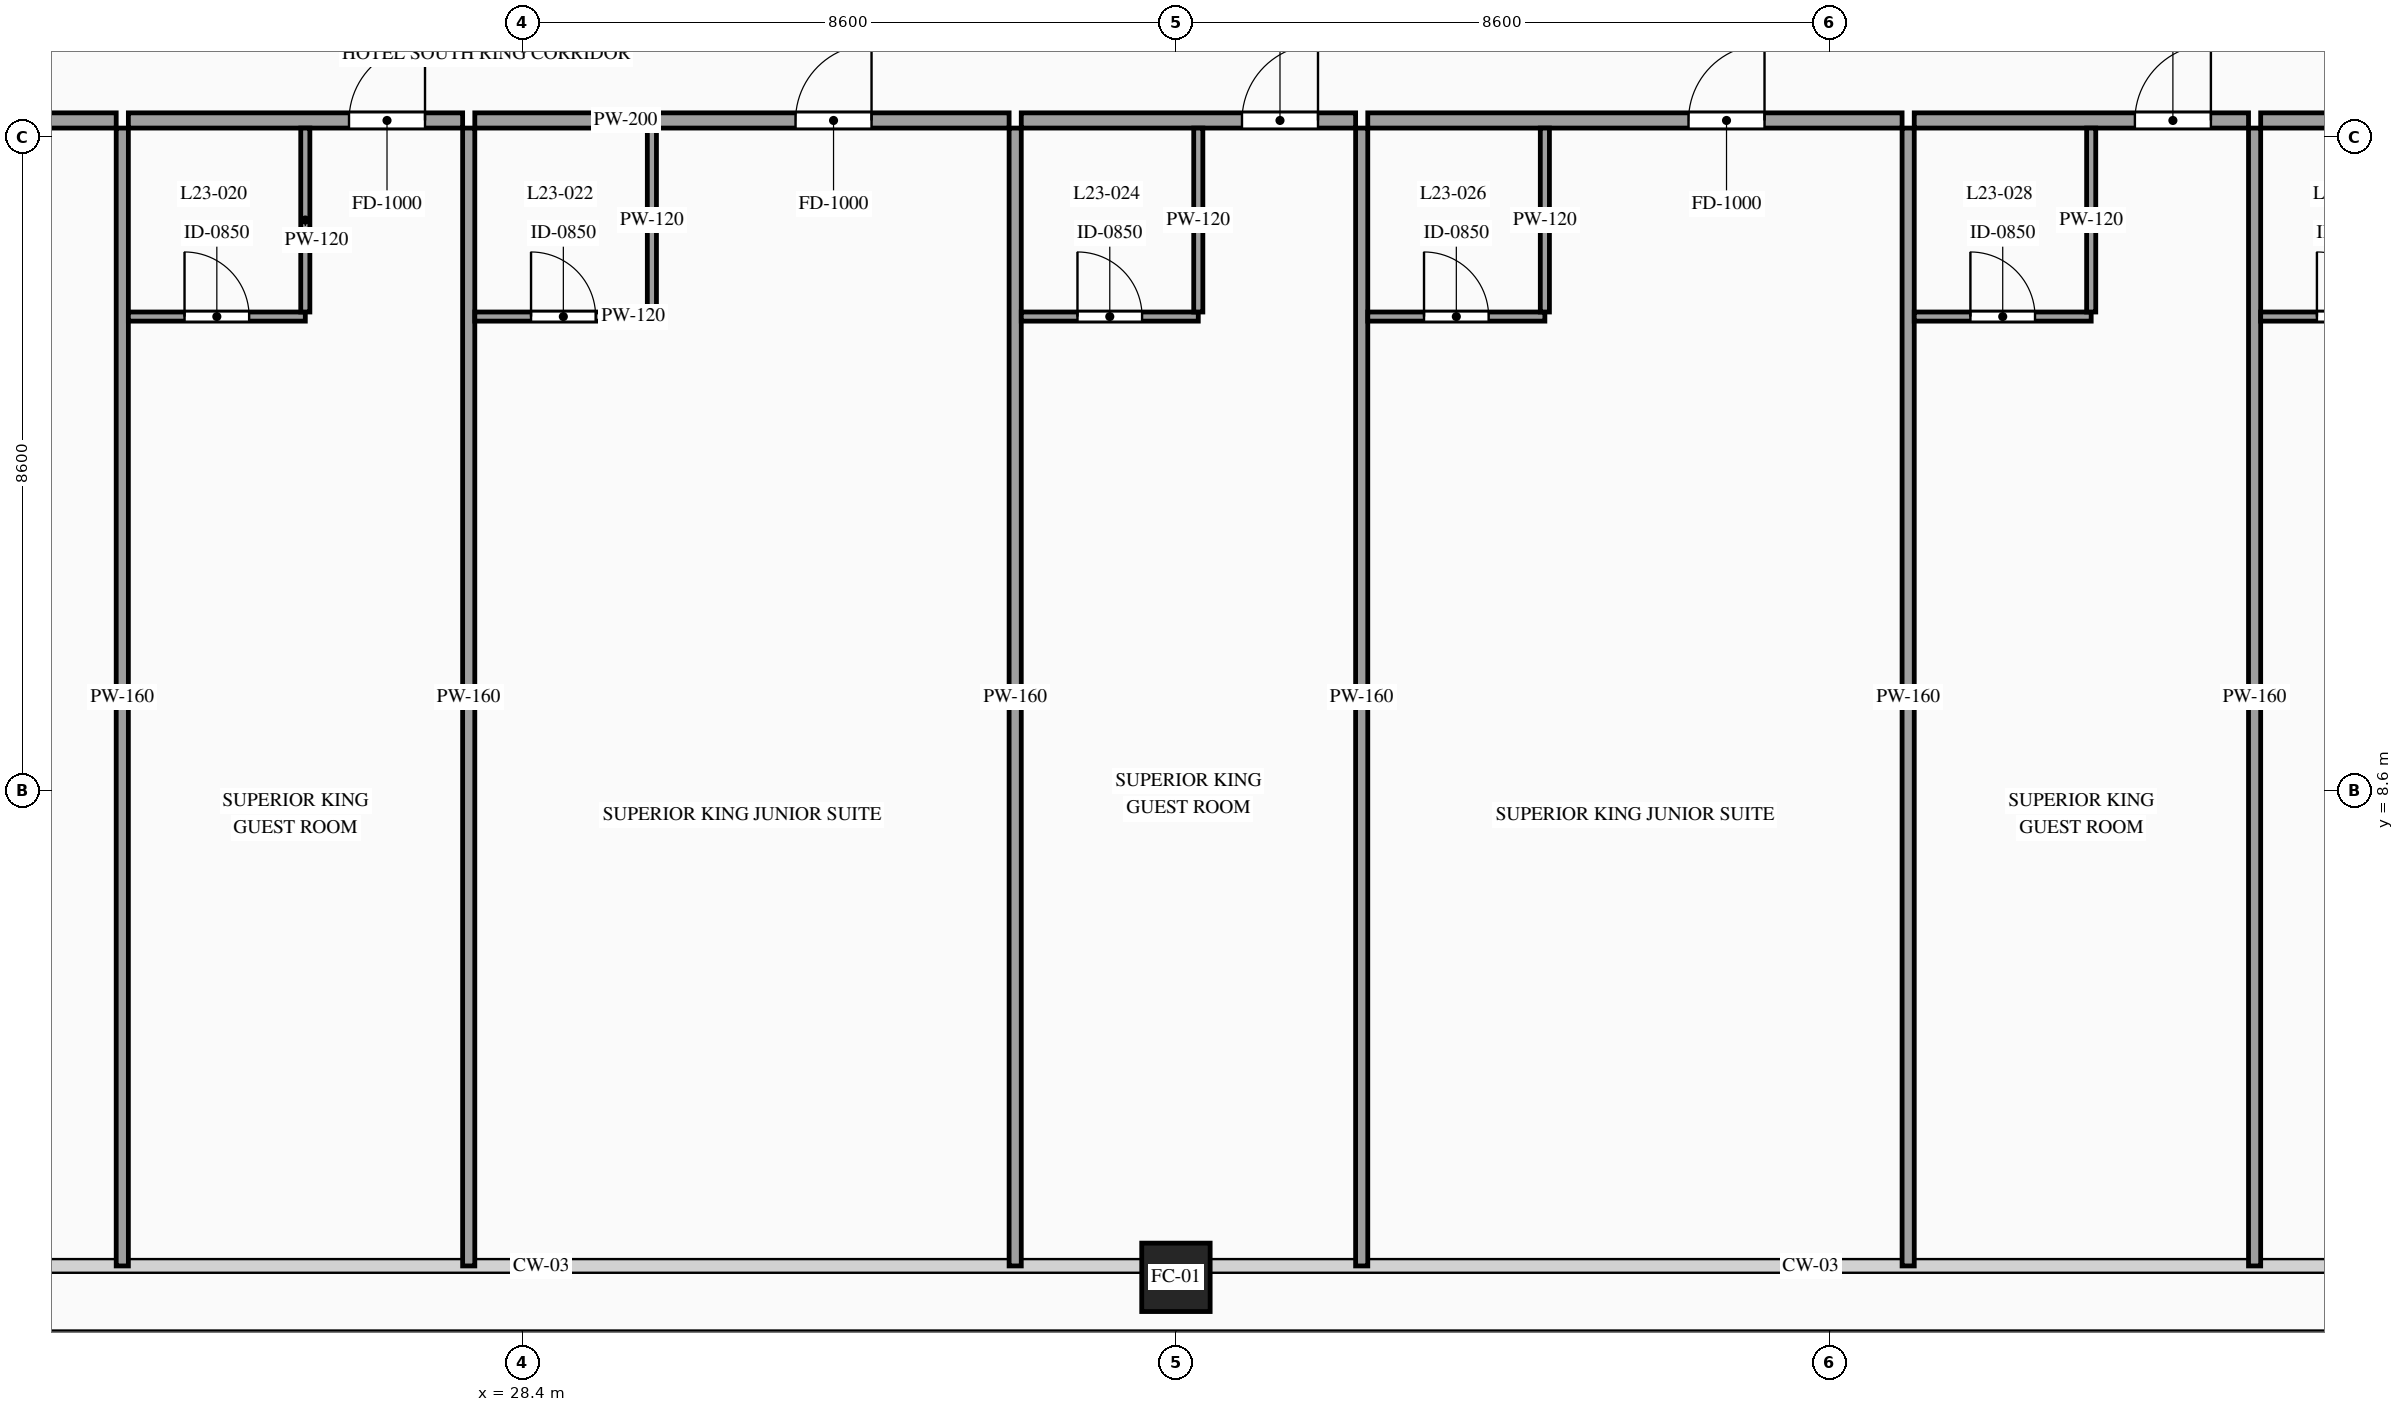
"""IFC4 building model, lengths in metres.
Left out: names, types, materials, properties, quantities, classifications, styles, units other than length and angle.
Written with IfcOpenShell. Run it as: python <this file> out.ifc"""

import sys

from ifc_helpers import new_model, si_unit, direction, frame, frame_2d, origin, origin_2d, place, context, subcontext, project, spatial, rectangle, hollow_rectangle, extrude, source, transform, mapped, element, fill, save


model = new_model("IFC4")
c1 = context("Model", 3, precision=1e-05, world=origin(), true_north=direction((0.0, 1.0)))
c2 = subcontext(c1, "Body", "Model", "MODEL_VIEW")
j1 = project(units=[si_unit("LENGTHUNIT", "METRE"), si_unit("PLANEANGLEUNIT", "RADIAN")], contexts=[c1])
p1 = place(None, origin())
s1 = spatial("IfcSite", under=j1, at=p1, CompositionType="ELEMENT")
p2 = place(p1, origin())
s2 = spatial("IfcBuilding", under=s1, at=p2, CompositionType="ELEMENT")
p3 = place(p2, frame((0.0, 0.0, 90.2)))
s3 = spatial("IfcBuildingStorey", under=s2, at=p3, CompositionType="ELEMENT", Elevation=90.2)
m1 = source(origin(), c2, "Body", "SweptSolid", [
    extrude(hollow_rectangle(XDim=0.9, YDim=0.9, WallThickness=0.042, at=origin_2d()), origin(), (0.0, 0.0, 1.0), 3.6),
])
p4 = place(p3, frame((37.0, 2.2, 0.0), z_axis=(0.0, 0.0, 1.0), x_axis=(1.0, 0.0, 0.0)))
e1 = element("IfcColumn", 1, at=p4, inside=s3, PredefinedType="COLUMN", context=c2, shape_type="MappedRepresentation", body=[
    mapped(m1, transform((0.0, 0.0, 0.0), scale=1.0)),
])
p5 = place(p3, frame((16.44, 17.42, 0.0), z_axis=(0.0, 0.0, 1.0), x_axis=(1.0, 0.0, 0.0)))
e2 = element("IfcWall", 2, at=p5, inside=s3, PredefinedType="PARTITIONING", context=c2, shape_type="SweptSolid", body=[
    extrude(rectangle(XDim=6.617, YDim=0.2, at=frame_2d((3.309, 0.0))), origin(), (0.0, 0.0, 1.0), 3.38),
])
p6 = place(p5, frame((4.013, 0.0, 0.0)))
e3 = element("IfcOpeningElement", 3, at=p6, cuts=e2, PredefinedType="OPENING", context=c2, shape_type="SweptSolid", body=[
    extrude(rectangle(XDim=1.0, YDim=2.2, at=frame_2d((0.5, 1.1))), frame((0.0, 0.115, 0.0), z_axis=(0.0, -1.0, 0.0), x_axis=(1.0, 0.0, 0.0)), (0.0, 0.0, 1.0), 0.23),
])
m2 = source(origin(), c2, "Body", "SweptSolid", [
    extrude(rectangle(XDim=14.97, YDim=0.16, at=frame_2d((7.485, 0.0))), origin(), (0.0, 0.0, 1.0), 3.38),
])
p7 = place(p3, frame((23.137, 2.35, 0.0), z_axis=(0.0, 0.0, 1.0), x_axis=(0.0, 1.0, 0.0)))
e4 = element("IfcWall", 4, at=p7, inside=s3, PredefinedType="PARTITIONING", context=c2, shape_type="MappedRepresentation", body=[
    mapped(m2, transform((0.0, 0.0, 0.0), scale=1.0)),
])
p8 = place(p3, frame((23.217, 17.42, 0.0), z_axis=(0.0, 0.0, 1.0), x_axis=(1.0, 0.0, 0.0)))
e5 = element("IfcWall", 5, at=p8, inside=s3, PredefinedType="PARTITIONING", context=c2, shape_type="SweptSolid", body=[
    extrude(rectangle(XDim=4.398, YDim=0.2, at=frame_2d((2.199, 0.0))), origin(), (0.0, 0.0, 1.0), 3.38),
])
p9 = place(p8, frame((2.903, 0.0, 0.0)))
e6 = element("IfcOpeningElement", 6, at=p9, cuts=e5, PredefinedType="OPENING", context=c2, shape_type="SweptSolid", body=[
    extrude(rectangle(XDim=1.0, YDim=2.2, at=frame_2d((0.5, 1.1))), frame((0.0, 0.115, 0.0), z_axis=(0.0, -1.0, 0.0), x_axis=(1.0, 0.0, 0.0)), (0.0, 0.0, 1.0), 0.23),
])
p10 = place(p3, frame((27.695, 2.35, 0.0), z_axis=(0.0, 0.0, 1.0), x_axis=(0.0, 1.0, 0.0)))
e7 = element("IfcWall", 7, at=p10, inside=s3, PredefinedType="PARTITIONING", context=c2, shape_type="MappedRepresentation", body=[
    mapped(m2, transform((0.0, 0.0, 0.0), scale=1.0)),
])
p11 = place(p3, frame((23.217, 14.84, 0.0), z_axis=(0.0, 0.0, 1.0), x_axis=(1.0, 0.0, 0.0)))
e8 = element("IfcWall", 8, at=p11, inside=s3, PredefinedType="PARTITIONING", context=c2, shape_type="SweptSolid", body=[
    extrude(rectangle(XDim=2.328, YDim=0.12, at=frame_2d((1.164, 0.0))), origin(), (0.0, 0.0, 1.0), 3.38),
])
p12 = place(p11, frame((0.739, 0.0, 0.0)))
e9 = element("IfcOpeningElement", 9, at=p12, cuts=e8, PredefinedType="OPENING", context=c2, shape_type="SweptSolid", body=[
    extrude(rectangle(XDim=0.85, YDim=2.1, at=frame_2d((0.425, 1.05))), frame((0.0, 0.075, 0.0), z_axis=(0.0, -1.0, 0.0), x_axis=(1.0, 0.0, 0.0)), (0.0, 0.0, 1.0), 0.15),
])
m3 = source(origin(), c2, "Body", "SweptSolid", [
    extrude(rectangle(XDim=2.42, YDim=0.12, at=frame_2d((1.21, 0.0))), origin(), (0.0, 0.0, 1.0), 3.38),
])
p13 = place(p3, frame((25.545, 14.9, 0.0), z_axis=(0.0, 0.0, 1.0), x_axis=(0.0, 1.0, 0.0)))
e10 = element("IfcWall", 10, at=p13, inside=s3, PredefinedType="PARTITIONING", context=c2, shape_type="MappedRepresentation", body=[
    mapped(m3, transform((0.0, 0.0, 0.0), scale=1.0)),
])
p14 = place(p3, frame((27.775, 17.42, 0.0), z_axis=(0.0, 0.0, 1.0), x_axis=(1.0, 0.0, 0.0)))
e11 = element("IfcWall", 11, at=p14, inside=s3, PredefinedType="PARTITIONING", context=c2, shape_type="SweptSolid", body=[
    extrude(rectangle(XDim=7.03, YDim=0.2, at=frame_2d((3.515, 0.0))), origin(), (0.0, 0.0, 1.0), 3.38),
])
p15 = place(p14, frame((4.22, 0.0, 0.0)))
e12 = element("IfcOpeningElement", 12, at=p15, cuts=e11, PredefinedType="OPENING", context=c2, shape_type="SweptSolid", body=[
    extrude(rectangle(XDim=1.0, YDim=2.2, at=frame_2d((0.5, 1.1))), frame((0.0, 0.115, 0.0), z_axis=(0.0, -1.0, 0.0), x_axis=(1.0, 0.0, 0.0)), (0.0, 0.0, 1.0), 0.23),
])
p16 = place(p3, frame((34.885, 2.35, 0.0), z_axis=(0.0, 0.0, 1.0), x_axis=(0.0, 1.0, 0.0)))
e13 = element("IfcWall", 13, at=p16, inside=s3, PredefinedType="PARTITIONING", context=c2, shape_type="MappedRepresentation", body=[
    mapped(m2, transform((0.0, 0.0, 0.0), scale=1.0)),
])
p17 = place(p3, frame((27.775, 14.84, 0.0), z_axis=(0.0, 0.0, 1.0), x_axis=(1.0, 0.0, 0.0)))
e14 = element("IfcWall", 14, at=p17, inside=s3, PredefinedType="PARTITIONING", context=c2, shape_type="SweptSolid", body=[
    extrude(rectangle(XDim=2.33, YDim=0.12, at=frame_2d((1.165, 0.0))), origin(), (0.0, 0.0, 1.0), 3.38),
])
p18 = place(p17, frame((0.74, 0.0, 0.0)))
e15 = element("IfcOpeningElement", 15, at=p18, cuts=e14, PredefinedType="OPENING", context=c2, shape_type="SweptSolid", body=[
    extrude(rectangle(XDim=0.85, YDim=2.1, at=frame_2d((0.425, 1.05))), frame((0.0, 0.075, 0.0), z_axis=(0.0, -1.0, 0.0), x_axis=(1.0, 0.0, 0.0)), (0.0, 0.0, 1.0), 0.15),
])
p19 = place(p3, frame((30.105, 14.9, 0.0), z_axis=(0.0, 0.0, 1.0), x_axis=(0.0, 1.0, 0.0)))
e16 = element("IfcWall", 16, at=p19, inside=s3, PredefinedType="PARTITIONING", context=c2, shape_type="MappedRepresentation", body=[
    mapped(m3, transform((0.0, 0.0, 0.0), scale=1.0)),
])
p20 = place(p3, frame((34.965, 17.42, 0.0), z_axis=(0.0, 0.0, 1.0), x_axis=(1.0, 0.0, 0.0)))
e17 = element("IfcWall", 17, at=p20, inside=s3, PredefinedType="PARTITIONING", context=c2, shape_type="SweptSolid", body=[
    extrude(rectangle(XDim=4.399, YDim=0.2, at=frame_2d((2.199, 0.0))), origin(), (0.0, 0.0, 1.0), 3.38),
])
p21 = place(p20, frame((2.904, 0.0, 0.0)))
e18 = element("IfcOpeningElement", 18, at=p21, cuts=e17, PredefinedType="OPENING", context=c2, shape_type="SweptSolid", body=[
    extrude(rectangle(XDim=1.0, YDim=2.2, at=frame_2d((0.5, 1.1))), frame((0.0, 0.115, 0.0), z_axis=(0.0, -1.0, 0.0), x_axis=(1.0, 0.0, 0.0)), (0.0, 0.0, 1.0), 0.23),
])
p22 = place(p3, frame((39.444, 2.35, 0.0), z_axis=(0.0, 0.0, 1.0), x_axis=(0.0, 1.0, 0.0)))
e19 = element("IfcWall", 19, at=p22, inside=s3, PredefinedType="PARTITIONING", context=c2, shape_type="MappedRepresentation", body=[
    mapped(m2, transform((0.0, 0.0, 0.0), scale=1.0)),
])
p23 = place(p3, frame((34.965, 14.84, 0.0), z_axis=(0.0, 0.0, 1.0), x_axis=(1.0, 0.0, 0.0)))
e20 = element("IfcWall", 20, at=p23, inside=s3, PredefinedType="PARTITIONING", context=c2, shape_type="SweptSolid", body=[
    extrude(rectangle(XDim=2.329, YDim=0.12, at=frame_2d((1.165, 0.0))), origin(), (0.0, 0.0, 1.0), 3.38),
])
p24 = place(p23, frame((0.74, 0.0, 0.0)))
e21 = element("IfcOpeningElement", 21, at=p24, cuts=e20, PredefinedType="OPENING", context=c2, shape_type="SweptSolid", body=[
    extrude(rectangle(XDim=0.85, YDim=2.1, at=frame_2d((0.425, 1.05))), frame((0.0, 0.075, 0.0), z_axis=(0.0, -1.0, 0.0), x_axis=(1.0, 0.0, 0.0)), (0.0, 0.0, 1.0), 0.15),
])
p25 = place(p3, frame((37.294, 14.9, 0.0), z_axis=(0.0, 0.0, 1.0), x_axis=(0.0, 1.0, 0.0)))
e22 = element("IfcWall", 22, at=p25, inside=s3, PredefinedType="PARTITIONING", context=c2, shape_type="MappedRepresentation", body=[
    mapped(m3, transform((0.0, 0.0, 0.0), scale=1.0)),
])
p26 = place(p3, frame((39.524, 17.42, 0.0), z_axis=(0.0, 0.0, 1.0), x_axis=(1.0, 0.0, 0.0)))
e23 = element("IfcWall", 23, at=p26, inside=s3, PredefinedType="PARTITIONING", context=c2, shape_type="SweptSolid", body=[
    extrude(rectangle(XDim=7.03, YDim=0.2, at=frame_2d((3.515, 0.0))), origin(), (0.0, 0.0, 1.0), 3.38),
])
p27 = place(p26, frame((4.22, 0.0, 0.0)))
e24 = element("IfcOpeningElement", 24, at=p27, cuts=e23, PredefinedType="OPENING", context=c2, shape_type="SweptSolid", body=[
    extrude(rectangle(XDim=1.0, YDim=2.2, at=frame_2d((0.5, 1.1))), frame((0.0, 0.115, 0.0), z_axis=(0.0, -1.0, 0.0), x_axis=(1.0, 0.0, 0.0)), (0.0, 0.0, 1.0), 0.23),
])
p28 = place(p3, frame((46.634, 2.35, 0.0), z_axis=(0.0, 0.0, 1.0), x_axis=(0.0, 1.0, 0.0)))
e25 = element("IfcWall", 25, at=p28, inside=s3, PredefinedType="PARTITIONING", context=c2, shape_type="MappedRepresentation", body=[
    mapped(m2, transform((0.0, 0.0, 0.0), scale=1.0)),
])
p29 = place(p3, frame((39.524, 14.84, 0.0), z_axis=(0.0, 0.0, 1.0), x_axis=(1.0, 0.0, 0.0)))
e26 = element("IfcWall", 26, at=p29, inside=s3, PredefinedType="PARTITIONING", context=c2, shape_type="SweptSolid", body=[
    extrude(rectangle(XDim=2.33, YDim=0.12, at=frame_2d((1.165, 0.0))), origin(), (0.0, 0.0, 1.0), 3.38),
])
p30 = place(p29, frame((0.74, 0.0, 0.0)))
e27 = element("IfcOpeningElement", 27, at=p30, cuts=e26, PredefinedType="OPENING", context=c2, shape_type="SweptSolid", body=[
    extrude(rectangle(XDim=0.85, YDim=2.1, at=frame_2d((0.425, 1.05))), frame((0.0, 0.075, 0.0), z_axis=(0.0, -1.0, 0.0), x_axis=(1.0, 0.0, 0.0)), (0.0, 0.0, 1.0), 0.15),
])
p31 = place(p3, frame((41.854, 14.9, 0.0), z_axis=(0.0, 0.0, 1.0), x_axis=(0.0, 1.0, 0.0)))
e28 = element("IfcWall", 28, at=p31, inside=s3, PredefinedType="PARTITIONING", context=c2, shape_type="MappedRepresentation", body=[
    mapped(m3, transform((0.0, 0.0, 0.0), scale=1.0)),
])
p32 = place(p3, frame((46.714, 17.42, 0.0), z_axis=(0.0, 0.0, 1.0), x_axis=(1.0, 0.0, 0.0)))
e29 = element("IfcWall", 29, at=p32, inside=s3, PredefinedType="PARTITIONING", context=c2, shape_type="SweptSolid", body=[
    extrude(rectangle(XDim=4.398, YDim=0.2, at=frame_2d((2.199, 0.0))), origin(), (0.0, 0.0, 1.0), 3.38),
])
p33 = place(p32, frame((2.903, 0.0, 0.0)))
e30 = element("IfcOpeningElement", 30, at=p33, cuts=e29, PredefinedType="OPENING", context=c2, shape_type="SweptSolid", body=[
    extrude(rectangle(XDim=1.0, YDim=2.2, at=frame_2d((0.5, 1.1))), frame((0.0, 0.115, 0.0), z_axis=(0.0, -1.0, 0.0), x_axis=(1.0, 0.0, 0.0)), (0.0, 0.0, 1.0), 0.23),
])
p34 = place(p3, frame((51.192, 2.35, 0.0), z_axis=(0.0, 0.0, 1.0), x_axis=(0.0, 1.0, 0.0)))
e31 = element("IfcWall", 31, at=p34, inside=s3, PredefinedType="PARTITIONING", context=c2, shape_type="MappedRepresentation", body=[
    mapped(m2, transform((0.0, 0.0, 0.0), scale=1.0)),
])
p35 = place(p3, frame((46.714, 14.84, 0.0), z_axis=(0.0, 0.0, 1.0), x_axis=(1.0, 0.0, 0.0)))
e32 = element("IfcWall", 32, at=p35, inside=s3, PredefinedType="PARTITIONING", context=c2, shape_type="SweptSolid", body=[
    extrude(rectangle(XDim=2.328, YDim=0.12, at=frame_2d((1.164, 0.0))), origin(), (0.0, 0.0, 1.0), 3.38),
])
p36 = place(p35, frame((0.739, 0.0, 0.0)))
e33 = element("IfcOpeningElement", 33, at=p36, cuts=e32, PredefinedType="OPENING", context=c2, shape_type="SweptSolid", body=[
    extrude(rectangle(XDim=0.85, YDim=2.1, at=frame_2d((0.425, 1.05))), frame((0.0, 0.075, 0.0), z_axis=(0.0, -1.0, 0.0), x_axis=(1.0, 0.0, 0.0)), (0.0, 0.0, 1.0), 0.15),
])
p37 = place(p3, frame((49.042, 14.9, 0.0), z_axis=(0.0, 0.0, 1.0), x_axis=(0.0, 1.0, 0.0)))
e34 = element("IfcWall", 34, at=p37, inside=s3, PredefinedType="PARTITIONING", context=c2, shape_type="MappedRepresentation", body=[
    mapped(m3, transform((0.0, 0.0, 0.0), scale=1.0)),
])
p38 = place(p3, frame((51.272, 17.42, 0.0), z_axis=(0.0, 0.0, 1.0), x_axis=(1.0, 0.0, 0.0)))
e35 = element("IfcWall", 35, at=p38, inside=s3, PredefinedType="PARTITIONING", context=c2, shape_type="SweptSolid", body=[
    extrude(rectangle(XDim=6.288, YDim=0.2, at=frame_2d((3.144, 0.0))), origin(), (0.0, 0.0, 1.0), 3.38),
])
p39 = place(p38, frame((3.849, 0.0, 0.0)))
e36 = element("IfcOpeningElement", 36, at=p39, cuts=e35, PredefinedType="OPENING", context=c2, shape_type="SweptSolid", body=[
    extrude(rectangle(XDim=1.0, YDim=2.2, at=frame_2d((0.5, 1.1))), frame((0.0, 0.115, 0.0), z_axis=(0.0, -1.0, 0.0), x_axis=(1.0, 0.0, 0.0)), (0.0, 0.0, 1.0), 0.23),
])
p40 = place(p3, frame((51.272, 14.84, 0.0), z_axis=(0.0, 0.0, 1.0), x_axis=(1.0, 0.0, 0.0)))
e37 = element("IfcWall", 37, at=p40, inside=s3, PredefinedType="PARTITIONING", context=c2, shape_type="SweptSolid", body=[
    extrude(rectangle(XDim=2.33, YDim=0.12, at=frame_2d((1.165, 0.0))), origin(), (0.0, 0.0, 1.0), 3.38),
])
p41 = place(p40, frame((0.74, 0.0, 0.0)))
e38 = element("IfcOpeningElement", 38, at=p41, cuts=e37, PredefinedType="OPENING", context=c2, shape_type="SweptSolid", body=[
    extrude(rectangle(XDim=0.85, YDim=2.1, at=frame_2d((0.425, 1.05))), frame((0.0, 0.075, 0.0), z_axis=(0.0, -1.0, 0.0), x_axis=(1.0, 0.0, 0.0)), (0.0, 0.0, 1.0), 0.15),
])
m4 = source(origin(), c2, "Body", "SweptSolid", [
    extrude(rectangle(XDim=1.0, YDim=2.2, at=frame_2d((0.5, 1.1))), frame((0.0, 0.025, 0.0), z_axis=(0.0, -1.0, 0.0), x_axis=(1.0, 0.0, 0.0)), (0.0, 0.0, 1.0), 0.05),
])
p42 = place(p9, origin())
e39 = element("IfcDoor", 39, at=p42, inside=s3, OperationType="SINGLE_SWING_RIGHT", PredefinedType="DOOR", context=c2, shape_type="MappedRepresentation", body=[
    mapped(m4, transform((0.0, 0.0, 0.0), scale=1.0)),
])
fill(e6, e39)
m5 = source(origin(), c2, "Body", "SweptSolid", [
    extrude(rectangle(XDim=0.85, YDim=2.1, at=frame_2d((0.425, 1.05))), frame((0.0, 0.025, 0.0), z_axis=(0.0, -1.0, 0.0), x_axis=(1.0, 0.0, 0.0)), (0.0, 0.0, 1.0), 0.05),
])
p43 = place(p12, origin())
e40 = element("IfcDoor", 40, at=p43, inside=s3, OperationType="SINGLE_SWING_LEFT", PredefinedType="DOOR", context=c2, shape_type="MappedRepresentation", body=[
    mapped(m5, transform((0.0, 0.0, 0.0), scale=1.0)),
])
fill(e9, e40)
p44 = place(p15, origin())
e41 = element("IfcDoor", 41, at=p44, inside=s3, OperationType="SINGLE_SWING_RIGHT", PredefinedType="DOOR", context=c2, shape_type="MappedRepresentation", body=[
    mapped(m4, transform((0.0, 0.0, 0.0), scale=1.0)),
])
fill(e12, e41)
p45 = place(p18, origin())
e42 = element("IfcDoor", 42, at=p45, inside=s3, OperationType="SINGLE_SWING_LEFT", PredefinedType="DOOR", context=c2, shape_type="MappedRepresentation", body=[
    mapped(m5, transform((0.0, 0.0, 0.0), scale=1.0)),
])
fill(e15, e42)
p46 = place(p21, origin())
e43 = element("IfcDoor", 43, at=p46, inside=s3, OperationType="SINGLE_SWING_RIGHT", PredefinedType="DOOR", context=c2, shape_type="MappedRepresentation", body=[
    mapped(m4, transform((0.0, 0.0, 0.0), scale=1.0)),
])
fill(e18, e43)
p47 = place(p24, origin())
e44 = element("IfcDoor", 44, at=p47, inside=s3, OperationType="SINGLE_SWING_LEFT", PredefinedType="DOOR", context=c2, shape_type="MappedRepresentation", body=[
    mapped(m5, transform((0.0, 0.0, 0.0), scale=1.0)),
])
fill(e21, e44)
p48 = place(p27, origin())
e45 = element("IfcDoor", 45, at=p48, inside=s3, OperationType="SINGLE_SWING_RIGHT", PredefinedType="DOOR", context=c2, shape_type="MappedRepresentation", body=[
    mapped(m4, transform((0.0, 0.0, 0.0), scale=1.0)),
])
fill(e24, e45)
p49 = place(p30, origin())
e46 = element("IfcDoor", 46, at=p49, inside=s3, OperationType="SINGLE_SWING_LEFT", PredefinedType="DOOR", context=c2, shape_type="MappedRepresentation", body=[
    mapped(m5, transform((0.0, 0.0, 0.0), scale=1.0)),
])
fill(e27, e46)
p50 = place(p33, origin())
e47 = element("IfcDoor", 47, at=p50, inside=s3, OperationType="SINGLE_SWING_RIGHT", PredefinedType="DOOR", context=c2, shape_type="MappedRepresentation", body=[
    mapped(m4, transform((0.0, 0.0, 0.0), scale=1.0)),
])
fill(e30, e47)
p51 = place(p36, origin())
e48 = element("IfcDoor", 48, at=p51, inside=s3, OperationType="SINGLE_SWING_LEFT", PredefinedType="DOOR", context=c2, shape_type="MappedRepresentation", body=[
    mapped(m5, transform((0.0, 0.0, 0.0), scale=1.0)),
])
fill(e33, e48)
p52 = place(p41, origin())
e49 = element("IfcDoor", 49, at=p52, inside=s3, OperationType="SINGLE_SWING_LEFT", PredefinedType="DOOR", context=c2, shape_type="MappedRepresentation", body=[
    mapped(m5, transform((0.0, 0.0, 0.0), scale=1.0)),
])
fill(e38, e49)
save(model, sys.argv[1])
